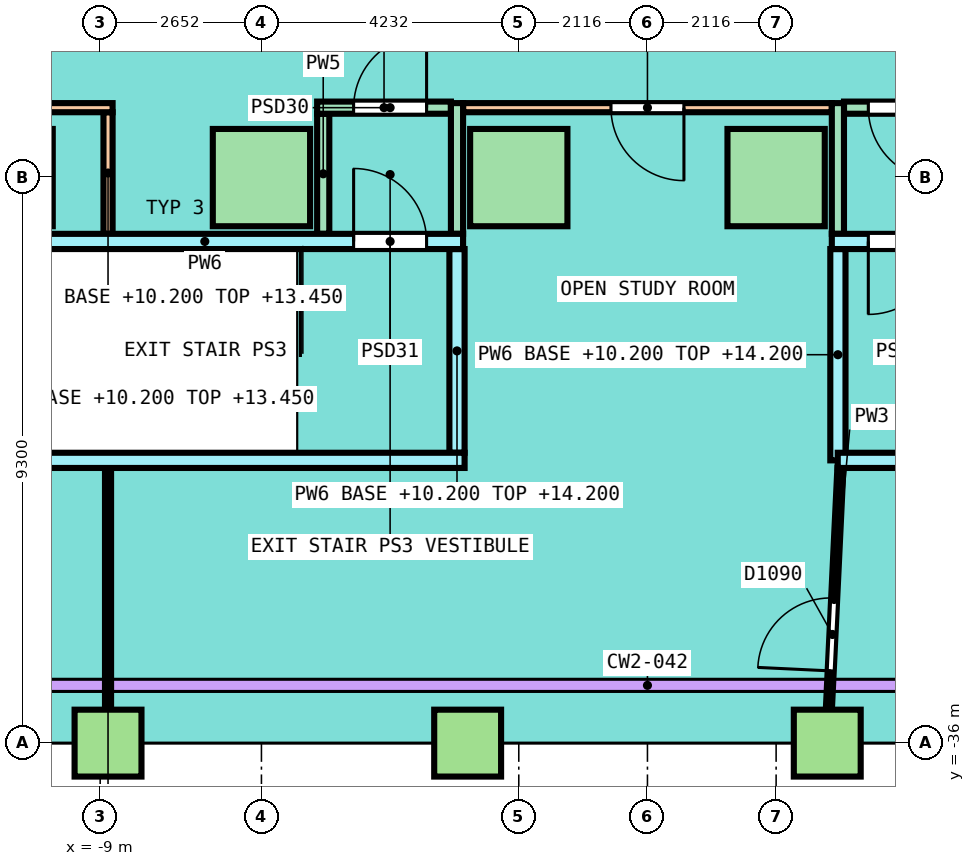
"""IFC4 building model, lengths in metres.
Left out: names, types, materials, properties, quantities, classifications, styles, units other than length and angle.
Written with IfcOpenShell. Run it as: python <this file> out.ifc"""

import sys

from ifc_helpers import new_model, si_unit, direction, frame, frame_2d, origin, origin_2d, place, context, subcontext, project, spatial, rectangle, extrude, element, fill, save


model = new_model("IFC4")
c1 = context("Model", 3, precision=1e-05, world=origin(), true_north=direction((0.0, 1.0)))
c2 = subcontext(c1, "Body", "Model", "MODEL_VIEW")
j1 = project(units=[si_unit("LENGTHUNIT", "METRE"), si_unit("PLANEANGLEUNIT", "RADIAN")], contexts=[c1])
p1 = place(None, origin())
s1 = spatial("IfcSite", under=j1, at=p1, CompositionType="ELEMENT")
p2 = place(p1, origin())
s2 = spatial("IfcBuilding", under=s1, at=p2, CompositionType="ELEMENT")
p3 = place(p2, frame((0.0, 0.0, 10.2)))
s3 = spatial("IfcBuildingStorey", under=s2, at=p3, CompositionType="ELEMENT", Elevation=10.2)
for number, where, z_axis, x_axis in (
    (1, (-10.58, -26.7, 0.0), (0.0, 0.0, 1.0), (1.0, 0.0, 0.0)),
    (2, (-6.348, -26.7, 0.0), (0.0, 0.0, 1.0), (1.0, 0.0, 0.0)),
    (3, (-2.116, -26.7, 0.0), (0.0, 0.0, 1.0), (1.0, 0.0, 0.0)),
    (4, (2.116, -26.7, 0.0), (0.0, 0.0, 1.0), (1.0, 0.0, 0.0)),
):
    element("IfcColumn", number, at=place(p3, frame(where, z_axis=z_axis, x_axis=x_axis)), inside=s3, PredefinedType="COLUMN", context=c2, shape_type="SweptSolid", body=[
        extrude(rectangle(XDim=1.6, YDim=1.6, at=origin_2d()), origin(), (0.0, 0.0, 1.0), 4.05),
    ])
for number, where, z_axis, x_axis in (
    (5, (-8.871, -36.0, 0.0), (0.0, 0.0, 1.0), (1.0, 0.0, 0.0)),
    (6, (-2.957, -36.0, 0.0), (0.0, 0.0, 1.0), (1.0, 0.0, 0.0)),
    (7, (2.957, -36.0, 0.0), (0.0, 0.0, 1.0), (1.0, 0.0, 0.0)),
):
    element("IfcColumn", number, at=place(p3, frame(where, z_axis=z_axis, x_axis=x_axis)), inside=s3, PredefinedType="COLUMN", context=c2, shape_type="SweptSolid", body=[
        extrude(rectangle(XDim=1.1, YDim=1.1, at=origin_2d()), origin(), (0.0, 0.0, 1.0), 4.05),
    ])
p4 = place(p3, frame((-8.871, -27.625, 0.0), z_axis=(0.0, 0.0, 1.0), x_axis=(0.0, 1.0, 0.0)))
e8 = element("IfcWall", 8, at=p4, inside=s3, PredefinedType="PARTITIONING", context=c2, shape_type="SweptSolid", body=[
    extrude(rectangle(XDim=2.0, YDim=0.15, at=frame_2d((1.0, 0.0))), origin(), (0.0, 0.0, 1.0), 3.25),
])
p5 = place(p3, frame((-10.347, -25.55, 0.0), z_axis=(0.0, 0.0, 1.0), x_axis=(1.0, 0.0, 0.0)))
e9 = element("IfcWall", 9, at=p5, inside=s3, PredefinedType="PARTITIONING", context=c2, shape_type="SweptSolid", body=[
    extrude(rectangle(XDim=1.551, YDim=0.15, at=frame_2d((0.775, 0.0))), origin(), (0.0, 0.0, 1.0), 3.05),
])
p6 = place(p3, frame((-3.032, -25.55, 0.0), z_axis=(0.0, 0.0, 1.0), x_axis=(1.0, 0.0, 0.0)))
e10 = element("IfcWall", 10, at=p6, inside=s3, PredefinedType="PARTITIONING", context=c2, shape_type="SweptSolid", body=[
    extrude(rectangle(XDim=6.064, YDim=0.15, at=frame_2d((3.032, 0.0))), origin(), (0.0, 0.0, 1.0), 3.05),
])
p7 = place(p6, frame((2.432, 0.0, 0.0)))
e11 = element("IfcOpeningElement", 11, at=p7, cuts=e10, PredefinedType="OPENING", context=c2, shape_type="SweptSolid", body=[
    extrude(rectangle(XDim=1.2, YDim=2.1, at=frame_2d((0.6, 1.05))), frame((0.0, 0.085, 0.0), z_axis=(0.0, -1.0, 0.0), x_axis=(1.0, 0.0, 0.0)), (0.0, 0.0, 1.0), 0.17),
])
p8 = place(p3, frame((-5.332, -27.625, 0.0), z_axis=(0.0, 0.0, 1.0), x_axis=(0.0, 1.0, 0.0)))
e12 = element("IfcWall", 12, at=p8, inside=s3, PredefinedType="PARTITIONING", context=c2, shape_type="SweptSolid", body=[
    extrude(rectangle(XDim=1.975, YDim=0.2, at=frame_2d((0.988, 0.0))), origin(), (0.0, 0.0, 1.0), 3.25),
])
p9 = place(p3, frame((-5.432, -25.55, 0.0), z_axis=(0.0, 0.0, 1.0), x_axis=(1.0, 0.0, 0.0)))
e13 = element("IfcWall", 13, at=p9, inside=s3, PredefinedType="PARTITIONING", context=c2, shape_type="SweptSolid", body=[
    extrude(rectangle(XDim=2.2, YDim=0.2, at=frame_2d((1.1, 0.0))), origin(), (0.0, 0.0, 1.0), 4.05),
])
p10 = place(p9, frame((1.8, 0.0, 0.0), z_axis=(0.0, 0.0, 1.0), x_axis=(-1.0, 0.0, 0.0)))
e14 = element("IfcOpeningElement", 14, at=p10, cuts=e13, PredefinedType="OPENING", context=c2, shape_type="SweptSolid", body=[
    extrude(rectangle(XDim=1.2, YDim=2.1, at=frame_2d((0.6, 1.05))), frame((0.0, 0.11, 0.0), z_axis=(0.0, -1.0, 0.0), x_axis=(1.0, 0.0, 0.0)), (0.0, 0.0, 1.0), 0.22),
])
p11 = place(p3, frame((3.232, -25.55, 0.0), z_axis=(0.0, 0.0, 1.0), x_axis=(1.0, 0.0, 0.0)))
e15 = element("IfcWall", 15, at=p11, inside=s3, PredefinedType="PARTITIONING", context=c2, shape_type="SweptSolid", body=[
    extrude(rectangle(XDim=2.2, YDim=0.2, at=frame_2d((1.1, 0.0))), origin(), (0.0, 0.0, 1.0), 4.05),
])
p12 = place(p11, frame((1.6, 0.0, 0.0), z_axis=(0.0, 0.0, 1.0), x_axis=(-1.0, 0.0, 0.0)))
e16 = element("IfcOpeningElement", 16, at=p12, cuts=e15, PredefinedType="OPENING", context=c2, shape_type="SweptSolid", body=[
    extrude(rectangle(XDim=1.2, YDim=2.1, at=frame_2d((0.6, 1.05))), frame((0.0, 0.11, 0.0), z_axis=(0.0, -1.0, 0.0), x_axis=(1.0, 0.0, 0.0)), (0.0, 0.0, 1.0), 0.22),
])
for number, where, z_axis, x_axis in (
    (17, (-3.132, -27.625, 0.0), (0.0, 0.0, 1.0), (0.0, 1.0, 0.0)),
    (18, (3.132, -27.625, 0.0), (0.0, 0.0, 1.0), (0.0, 1.0, 0.0)),
):
    element("IfcWall", number, at=place(p3, frame(where, z_axis=z_axis, x_axis=x_axis)), inside=s3, PredefinedType="PARTITIONING", context=c2, shape_type="SweptSolid", body=[
        extrude(rectangle(XDim=2.15, YDim=0.2, at=frame_2d((1.075, 0.0))), origin(), (0.0, 0.0, 1.0), 3.25),
    ])
p13 = place(p3, frame((-8.871, -35.8, 0.0), z_axis=(0.0, 0.0, 1.0), x_axis=(0.0, 1.0, 0.0)))
e19 = element("IfcWall", 19, at=p13, inside=s3, PredefinedType="PARTITIONING", context=c2, shape_type="SweptSolid", body=[
    extrude(rectangle(XDim=4.325, YDim=0.1, at=frame_2d((2.163, 0.0))), origin(), (0.0, 0.0, 1.0), 4.0),
])
p14 = place(p3, frame((2.967, -35.8, 0.0), z_axis=(0.0, 0.0, 1.0), x_axis=(0.047755341285, 0.998859062821, 0.0)))
e20 = element("IfcWall", 20, at=p14, inside=s3, PredefinedType="PARTITIONING", context=c2, shape_type="SweptSolid", body=[
    extrude(rectangle(XDim=4.33, YDim=0.1, at=frame_2d((2.165, 0.0))), origin(), (0.0, 0.0, 1.0), 3.2),
])
p15 = place(p14, frame((0.989, 0.0, 0.0)))
e21 = element("IfcOpeningElement", 21, at=p15, cuts=e20, PredefinedType="OPENING", context=c2, shape_type="SweptSolid", body=[
    extrude(rectangle(XDim=1.2, YDim=2.1, at=frame_2d((0.6, 1.05))), frame((0.0, 0.06, 0.0), z_axis=(0.0, -1.0, 0.0), x_axis=(1.0, 0.0, 0.0)), (0.0, 0.0, 1.0), 0.12),
])
p16 = place(p3, frame((-3.132, -31.225, 0.0), z_axis=(0.0, 0.0, 1.0), x_axis=(0.0, 1.0, 0.0)))
e22 = element("IfcWall", 22, at=p16, inside=s3, PredefinedType="SOLIDWALL", context=c2, shape_type="SweptSolid", body=[
    extrude(rectangle(XDim=3.35, YDim=0.25, at=frame_2d((1.675, 0.0))), origin(), (0.0, 0.0, 1.0), 4.0),
])
p17 = place(p3, frame((3.132, -31.35, 0.0), z_axis=(0.0, 0.0, 1.0), x_axis=(0.0, 1.0, 0.0)))
e23 = element("IfcWall", 23, at=p17, inside=s3, PredefinedType="SOLIDWALL", context=c2, shape_type="SweptSolid", body=[
    extrude(rectangle(XDim=3.475, YDim=0.25, at=frame_2d((1.738, 0.0))), origin(), (0.0, 0.0, 1.0), 4.0),
])
p18 = place(p3, frame((-11.527, -27.75, 0.0), z_axis=(0.0, 0.0, 1.0), x_axis=(1.0, 0.0, 0.0)))
e24 = element("IfcWall", 24, at=p18, inside=s3, PredefinedType="SOLIDWALL", context=c2, shape_type="SweptSolid", body=[
    extrude(rectangle(XDim=8.495, YDim=0.25, at=frame_2d((4.248, 0.0))), origin(), (0.0, 0.0, 1.0), 3.2),
])
p19 = place(p18, frame((7.895, 0.0, 0.0), z_axis=(0.0, 0.0, 1.0), x_axis=(-1.0, 0.0, 0.0)))
e25 = element("IfcOpeningElement", 25, at=p19, cuts=e24, PredefinedType="OPENING", context=c2, shape_type="SweptSolid", body=[
    extrude(rectangle(XDim=1.2, YDim=2.1, at=frame_2d((0.6, 1.05))), frame((0.0, 0.135, 0.0), z_axis=(0.0, -1.0, 0.0), x_axis=(1.0, 0.0, 0.0)), (0.0, 0.0, 1.0), 0.27),
])
p20 = place(p3, frame((3.032, -27.75, 0.0), z_axis=(0.0, 0.0, 1.0), x_axis=(1.0, 0.0, 0.0)))
e26 = element("IfcWall", 26, at=p20, inside=s3, PredefinedType="SOLIDWALL", context=c2, shape_type="SweptSolid", body=[
    extrude(rectangle(XDim=8.495, YDim=0.25, at=frame_2d((4.248, 0.0))), origin(), (0.0, 0.0, 1.0), 3.2),
])
p21 = place(p20, frame((1.8, 0.0, 0.0), z_axis=(0.0, 0.0, 1.0), x_axis=(-1.0, 0.0, 0.0)))
e27 = element("IfcOpeningElement", 27, at=p21, cuts=e26, PredefinedType="OPENING", context=c2, shape_type="SweptSolid", body=[
    extrude(rectangle(XDim=1.2, YDim=2.1, at=frame_2d((0.6, 1.05))), frame((0.0, 0.135, 0.0), z_axis=(0.0, -1.0, 0.0), x_axis=(1.0, 0.0, 0.0)), (0.0, 0.0, 1.0), 0.27),
])
p22 = place(p3, frame((-11.527, -31.35, 0.0), z_axis=(0.0, 0.0, 1.0), x_axis=(1.0, 0.0, 0.0)))
e28 = element("IfcWall", 28, at=p22, inside=s3, PredefinedType="SOLIDWALL", context=c2, shape_type="SweptSolid", body=[
    extrude(rectangle(XDim=8.52, YDim=0.25, at=frame_2d((4.26, 0.0))), origin(), (0.0, 0.0, 1.0), 3.2),
])
p23 = place(p3, frame((3.129, -31.35, 0.0), z_axis=(0.0, 0.0, 1.0), x_axis=(1.0, 0.0, 0.0)))
e29 = element("IfcWall", 29, at=p23, inside=s3, PredefinedType="SOLIDWALL", context=c2, shape_type="SweptSolid", body=[
    extrude(rectangle(XDim=8.397, YDim=0.25, at=frame_2d((4.199, 0.0))), origin(), (0.0, 0.0, 1.0), 3.2),
])
p24 = place(p7, origin())
e30 = element("IfcDoor", 30, at=p24, inside=s3, OperationType="DOUBLE_DOOR_SINGLE_SWING", PredefinedType="DOOR", context=c2, shape_type="SweptSolid", body=[
    extrude(rectangle(XDim=1.2, YDim=2.1, at=frame_2d((0.6, 1.05))), frame((0.0, 0.025, 0.0), z_axis=(0.0, -1.0, 0.0), x_axis=(1.0, 0.0, 0.0)), (0.0, 0.0, 1.0), 0.05),
])
fill(e11, e30)
p25 = place(p15, origin())
e31 = element("IfcDoor", 31, at=p25, inside=s3, OperationType="DOUBLE_DOOR_SINGLE_SWING", PredefinedType="DOOR", context=c2, shape_type="SweptSolid", body=[
    extrude(rectangle(XDim=1.2, YDim=2.1, at=frame_2d((0.6, 1.05))), frame((0.0, 0.025, 0.0), z_axis=(0.0, -1.0, 0.0), x_axis=(1.0, 0.0, 0.0)), (0.0, 0.0, 1.0), 0.05),
])
fill(e21, e31)
p26 = place(p10, origin())
e32 = element("IfcDoor", 32, at=p26, inside=s3, OperationType="SINGLE_SWING_LEFT", PredefinedType="DOOR", context=c2, shape_type="SweptSolid", body=[
    extrude(rectangle(XDim=1.2, YDim=2.1, at=frame_2d((0.6, 1.05))), frame((0.0, 0.025, 0.0), z_axis=(0.0, -1.0, 0.0), x_axis=(1.0, 0.0, 0.0)), (0.0, 0.0, 1.0), 0.05),
])
fill(e14, e32)
p27 = place(p19, origin())
e33 = element("IfcDoor", 33, at=p27, inside=s3, OperationType="SINGLE_SWING_RIGHT", PredefinedType="DOOR", context=c2, shape_type="SweptSolid", body=[
    extrude(rectangle(XDim=1.2, YDim=2.1, at=frame_2d((0.6, 1.05))), frame((0.0, 0.025, 0.0), z_axis=(0.0, -1.0, 0.0), x_axis=(1.0, 0.0, 0.0)), (0.0, 0.0, 1.0), 0.05),
])
fill(e25, e33)
p28 = place(p12, origin())
e34 = element("IfcDoor", 34, at=p28, inside=s3, OperationType="SINGLE_SWING_LEFT", PredefinedType="DOOR", context=c2, shape_type="SweptSolid", body=[
    extrude(rectangle(XDim=1.2, YDim=2.1, at=frame_2d((0.6, 1.05))), frame((0.0, 0.025, 0.0), z_axis=(0.0, -1.0, 0.0), x_axis=(1.0, 0.0, 0.0)), (0.0, 0.0, 1.0), 0.05),
])
fill(e16, e34)
p29 = place(p21, origin())
e35 = element("IfcDoor", 35, at=p29, inside=s3, OperationType="SINGLE_SWING_RIGHT", PredefinedType="DOOR", context=c2, shape_type="SweptSolid", body=[
    extrude(rectangle(XDim=1.2, YDim=2.1, at=frame_2d((0.6, 1.05))), frame((0.0, 0.025, 0.0), z_axis=(0.0, -1.0, 0.0), x_axis=(1.0, 0.0, 0.0)), (0.0, 0.0, 1.0), 0.05),
])
fill(e27, e35)
save(model, sys.argv[1])
